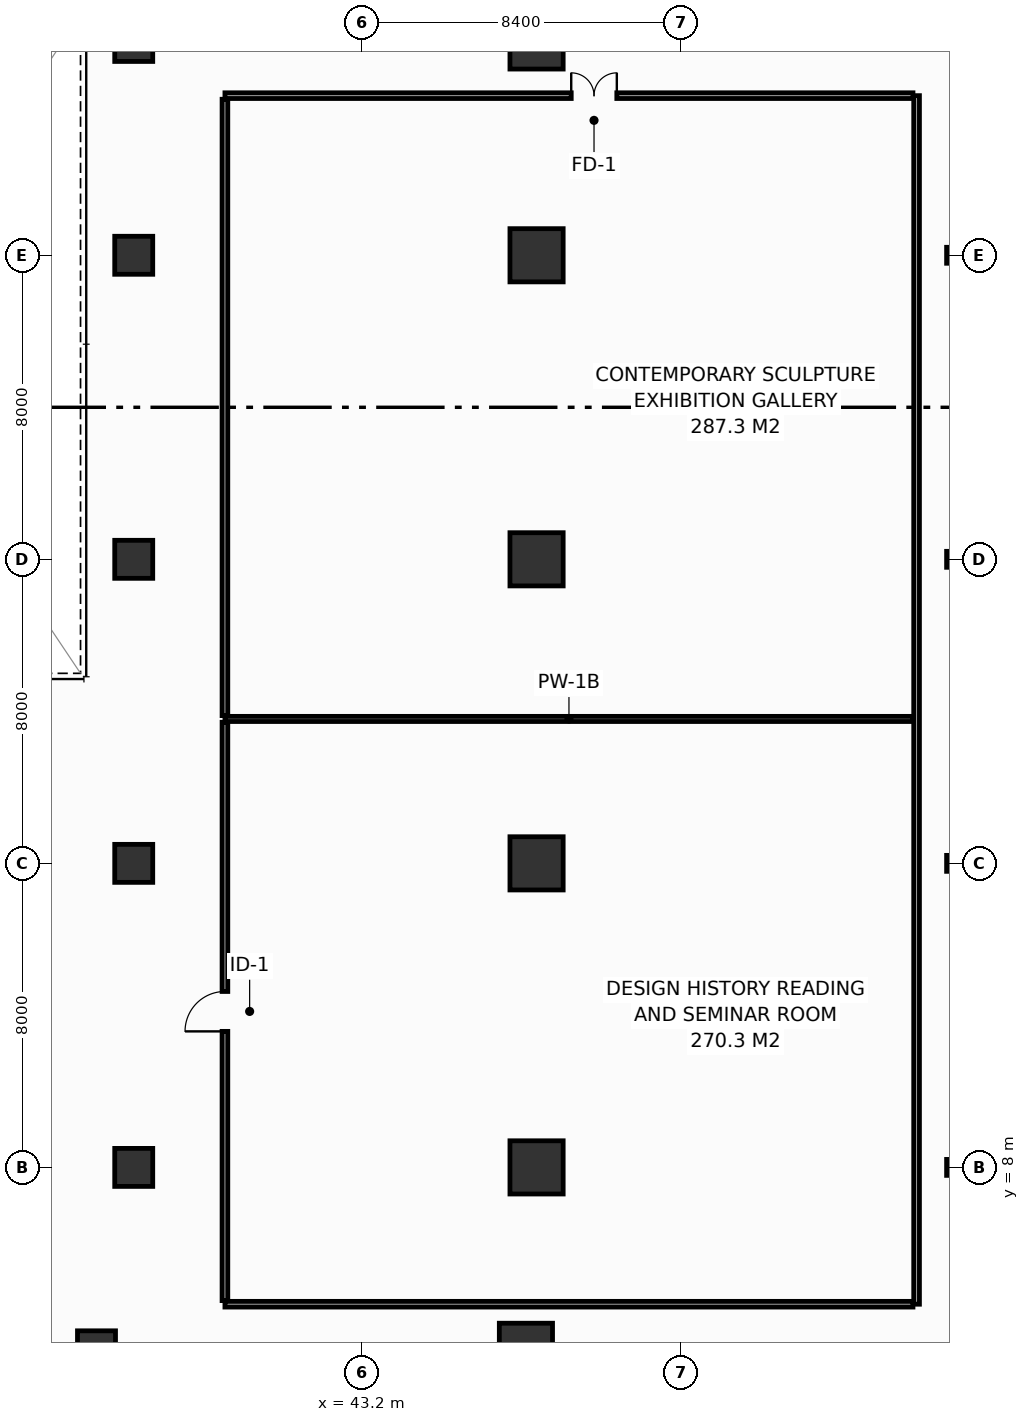
"""IFC4 building model, lengths in metres.
Left out: names, types, materials, properties, quantities, classifications, styles, units other than length and angle.
Written with IfcOpenShell. Run it as: python <this file> out.ifc"""

import sys

from ifc_helpers import new_model, si_unit, direction, frame, frame_2d, origin, origin_2d, place, context, subcontext, project, spatial, rectangle, hollow_rectangle, i_section, extrude, element, fill, save


model = new_model("IFC4")
c1 = context("Model", 3, precision=1e-05, world=origin(), true_north=direction((0.0, 1.0)))
c2 = subcontext(c1, "Body", "Model", "MODEL_VIEW")
j1 = project(units=[si_unit("LENGTHUNIT", "METRE"), si_unit("PLANEANGLEUNIT", "RADIAN")], contexts=[c1])
p1 = place(None, origin())
s1 = spatial("IfcSite", under=j1, at=p1, CompositionType="ELEMENT")
p2 = place(p1, origin())
s2 = spatial("IfcBuilding", under=s1, at=p2, CompositionType="ELEMENT")
p3 = place(p2, frame((0.0, 0.0, 11.4)))
s3 = spatial("IfcBuildingStorey", under=s2, at=p3, CompositionType="ELEMENT", Elevation=11.4)
p4 = place(p3, frame((36.22, 3.2, 0.0), z_axis=(0.0, 0.0, 1.0), x_axis=(1.0, 0.0, 0.0)))
e1 = element("IfcColumn", 1, at=p4, inside=s3, PredefinedType="COLUMN", context=c2, shape_type="SweptSolid", body=[
    extrude(hollow_rectangle(XDim=1.0, YDim=1.0, WallThickness=0.045, at=origin_2d()), origin(), (0.0, 0.0, 1.0), 5.4),
])
p5 = place(p3, frame((47.52, 3.2, 0.0), z_axis=(0.0, 0.0, 1.0), x_axis=(1.0, 0.0, 0.0)))
e2 = element("IfcColumn", 2, at=p5, inside=s3, PredefinedType="COLUMN", context=c2, shape_type="SweptSolid", body=[
    extrude(hollow_rectangle(XDim=1.4, YDim=1.4, WallThickness=0.065, at=origin_2d()), origin(), (0.0, 0.0, 1.0), 5.4),
])
p6 = place(p3, frame((37.2, 8.0, 0.0), z_axis=(0.0, 0.0, 1.0), x_axis=(1.0, 0.0, 0.0)))
e3 = element("IfcColumn", 3, at=p6, inside=s3, PredefinedType="COLUMN", context=c2, shape_type="SweptSolid", body=[
    extrude(hollow_rectangle(XDim=1.0, YDim=1.0, WallThickness=0.045, at=origin_2d()), origin(), (0.0, 0.0, 1.0), 5.4),
])
p7 = place(p3, frame((47.8, 8.0, 0.0), z_axis=(0.0, 0.0, 1.0), x_axis=(1.0, 0.0, 0.0)))
e4 = element("IfcColumn", 4, at=p7, inside=s3, PredefinedType="COLUMN", context=c2, shape_type="SweptSolid", body=[
    extrude(hollow_rectangle(XDim=1.4, YDim=1.4, WallThickness=0.065, at=origin_2d()), origin(), (0.0, 0.0, 1.0), 5.4),
])
p8 = place(p3, frame((37.2, 16.0, 0.0), z_axis=(0.0, 0.0, 1.0), x_axis=(1.0, 0.0, 0.0)))
e5 = element("IfcColumn", 5, at=p8, inside=s3, PredefinedType="COLUMN", context=c2, shape_type="SweptSolid", body=[
    extrude(hollow_rectangle(XDim=1.0, YDim=1.0, WallThickness=0.045, at=origin_2d()), origin(), (0.0, 0.0, 1.0), 5.4),
])
p9 = place(p3, frame((47.8, 16.0, 0.0), z_axis=(0.0, 0.0, 1.0), x_axis=(1.0, 0.0, 0.0)))
e6 = element("IfcColumn", 6, at=p9, inside=s3, PredefinedType="COLUMN", context=c2, shape_type="SweptSolid", body=[
    extrude(hollow_rectangle(XDim=1.4, YDim=1.4, WallThickness=0.065, at=origin_2d()), origin(), (0.0, 0.0, 1.0), 5.4),
])
p10 = place(p3, frame((37.2, 24.0, 0.0), z_axis=(0.0, 0.0, 1.0), x_axis=(1.0, 0.0, 0.0)))
e7 = element("IfcColumn", 7, at=p10, inside=s3, PredefinedType="COLUMN", context=c2, shape_type="SweptSolid", body=[
    extrude(hollow_rectangle(XDim=1.0, YDim=1.0, WallThickness=0.045, at=origin_2d()), origin(), (0.0, 0.0, 1.0), 5.4),
])
p11 = place(p3, frame((47.8, 24.0, 0.0), z_axis=(0.0, 0.0, 1.0), x_axis=(1.0, 0.0, 0.0)))
e8 = element("IfcColumn", 8, at=p11, inside=s3, PredefinedType="COLUMN", context=c2, shape_type="SweptSolid", body=[
    extrude(hollow_rectangle(XDim=1.4, YDim=1.4, WallThickness=0.065, at=origin_2d()), origin(), (0.0, 0.0, 1.0), 5.4),
])
p12 = place(p3, frame((37.2, 32.0, 0.0), z_axis=(0.0, 0.0, 1.0), x_axis=(1.0, 0.0, 0.0)))
e9 = element("IfcColumn", 9, at=p12, inside=s3, PredefinedType="COLUMN", context=c2, shape_type="SweptSolid", body=[
    extrude(hollow_rectangle(XDim=1.0, YDim=1.0, WallThickness=0.045, at=origin_2d()), origin(), (0.0, 0.0, 1.0), 5.4),
])
p13 = place(p3, frame((47.8, 32.0, 0.0), z_axis=(0.0, 0.0, 1.0), x_axis=(1.0, 0.0, 0.0)))
e10 = element("IfcColumn", 10, at=p13, inside=s3, PredefinedType="COLUMN", context=c2, shape_type="SweptSolid", body=[
    extrude(hollow_rectangle(XDim=1.4, YDim=1.4, WallThickness=0.065, at=origin_2d()), origin(), (0.0, 0.0, 1.0), 5.4),
])
p14 = place(p3, frame((37.2, 37.6, 0.0), z_axis=(0.0, 0.0, 1.0), x_axis=(1.0, 0.0, 0.0)))
e11 = element("IfcColumn", 11, at=p14, inside=s3, PredefinedType="COLUMN", context=c2, shape_type="SweptSolid", body=[
    extrude(hollow_rectangle(XDim=1.0, YDim=1.0, WallThickness=0.045, at=origin_2d()), origin(), (0.0, 0.0, 1.0), 5.4),
])
p15 = place(p3, frame((47.8, 37.6, 0.0), z_axis=(0.0, 0.0, 1.0), x_axis=(1.0, 0.0, 0.0)))
e12 = element("IfcColumn", 12, at=p15, inside=s3, PredefinedType="COLUMN", context=c2, shape_type="SweptSolid", body=[
    extrude(hollow_rectangle(XDim=1.4, YDim=1.4, WallThickness=0.065, at=origin_2d()), origin(), (0.0, 0.0, 1.0), 5.4),
])
for number, where, z_axis, x_axis in (
    (13, (58.8, 8.0, 0.0), (0.0, 0.0, 1.0), (1.0, 0.0, 0.0)),
    (14, (58.8, 16.0, 0.0), (0.0, 0.0, 1.0), (1.0, 0.0, 0.0)),
    (15, (58.8, 24.0, 0.0), (0.0, 0.0, 1.0), (1.0, 0.0, 0.0)),
    (16, (58.8, 32.0, 0.0), (0.0, 0.0, 1.0), (1.0, 0.0, 0.0)),
):
    element("IfcColumn", number, at=place(p3, frame(where, z_axis=z_axis, x_axis=x_axis)), inside=s3, PredefinedType="COLUMN", context=c2, shape_type="SweptSolid", body=[
        extrude(i_section(OverallWidth=0.42, OverallDepth=0.42, WebThickness=0.02, FlangeThickness=0.035, FilletRadius=0.022, at=origin_2d()), origin(), (0.0, 0.0, 1.0), 5.4),
    ])
p16 = place(p3, frame((57.8, 4.4, 0.0), z_axis=(0.0, 0.0, 1.0), x_axis=(0.0, 1.0, 0.0)))
e17 = element("IfcWall", 17, at=p16, inside=s3, PredefinedType="PARTITIONING", context=c2, shape_type="SweptSolid", body=[
    extrude(rectangle(XDim=31.8, YDim=0.15, at=frame_2d((15.9, 0.0))), origin(), (0.0, 0.0, 1.0), 4.185),
])
p17 = place(p3, frame((39.6, 4.4, 0.0), z_axis=(0.0, 0.0, 1.0), x_axis=(1.0, 0.0, 0.0)))
e18 = element("IfcWall", 18, at=p17, inside=s3, PredefinedType="PARTITIONING", context=c2, shape_type="SweptSolid", body=[
    extrude(rectangle(XDim=18.105, YDim=0.15, at=frame_2d((9.052, 0.0))), origin(), (0.0, 0.0, 1.0), 4.185),
])
p18 = place(p3, frame((39.6, 19.8, 0.0), z_axis=(0.0, 0.0, 1.0), x_axis=(1.0, 0.0, 0.0)))
e19 = element("IfcWall", 19, at=p18, inside=s3, PredefinedType="PARTITIONING", context=c2, shape_type="SweptSolid", body=[
    extrude(rectangle(XDim=18.105, YDim=0.135, at=frame_2d((9.052, 0.0))), origin(), (0.0, 0.0, 1.0), 4.185),
])
p19 = place(p3, frame((39.6, 36.2, 0.0), z_axis=(0.0, 0.0, 1.0), x_axis=(1.0, 0.0, 0.0)))
e20 = element("IfcWall", 20, at=p19, inside=s3, PredefinedType="PARTITIONING", context=c2, shape_type="SweptSolid", body=[
    extrude(rectangle(XDim=18.105, YDim=0.15, at=frame_2d((9.052, 0.0))), origin(), (0.0, 0.0, 1.0), 4.185),
])
p20 = place(p19, frame((9.112, 0.0, 0.0)))
e21 = element("IfcOpeningElement", 21, at=p20, cuts=e20, PredefinedType="OPENING", context=c2, shape_type="SweptSolid", body=[
    extrude(rectangle(XDim=1.2, YDim=2.15, at=frame_2d((0.6, 1.075))), frame((0.0, 0.085, 0.0), z_axis=(0.0, -1.0, 0.0), x_axis=(1.0, 0.0, 0.0)), (0.0, 0.0, 1.0), 0.17),
])
p21 = place(p3, frame((39.6, 4.495, 0.0), z_axis=(0.0, 0.0, 1.0), x_axis=(0.0, 1.0, 0.0)))
e22 = element("IfcWall", 22, at=p21, inside=s3, PredefinedType="PARTITIONING", context=c2, shape_type="SweptSolid", body=[
    extrude(rectangle(XDim=15.217, YDim=0.15, at=frame_2d((7.609, 0.0))), origin(), (0.0, 0.0, 1.0), 4.185),
])
p22 = place(p21, frame((7.084, 0.0, 0.0)))
e23 = element("IfcOpeningElement", 23, at=p22, cuts=e22, PredefinedType="OPENING", context=c2, shape_type="SweptSolid", body=[
    extrude(rectangle(XDim=1.05, YDim=2.15, at=frame_2d((0.525, 1.075))), frame((0.0, 0.085, 0.0), z_axis=(0.0, -1.0, 0.0), x_axis=(1.0, 0.0, 0.0)), (0.0, 0.0, 1.0), 0.17),
])
p23 = place(p3, frame((39.6, 19.887, 0.0), z_axis=(0.0, 0.0, 1.0), x_axis=(0.0, 1.0, 0.0)))
e24 = element("IfcWall", 24, at=p23, inside=s3, PredefinedType="PARTITIONING", context=c2, shape_type="SweptSolid", body=[
    extrude(rectangle(XDim=16.218, YDim=0.15, at=frame_2d((8.109, 0.0))), origin(), (0.0, 0.0, 1.0), 4.185),
])
p24 = place(p20, origin())
e25 = element("IfcDoor", 25, at=p24, inside=s3, OperationType="DOUBLE_DOOR_SINGLE_SWING", PredefinedType="DOOR", context=c2, shape_type="SweptSolid", body=[
    extrude(rectangle(XDim=1.2, YDim=2.15, at=frame_2d((0.6, 1.075))), frame((0.0, 0.025, 0.0), z_axis=(0.0, -1.0, 0.0), x_axis=(1.0, 0.0, 0.0)), (0.0, 0.0, 1.0), 0.05),
])
fill(e21, e25)
p25 = place(p22, origin())
e26 = element("IfcDoor", 26, at=p25, inside=s3, OperationType="SINGLE_SWING_LEFT", PredefinedType="DOOR", context=c2, shape_type="SweptSolid", body=[
    extrude(rectangle(XDim=1.05, YDim=2.15, at=frame_2d((0.525, 1.075))), frame((0.0, 0.025, 0.0), z_axis=(0.0, -1.0, 0.0), x_axis=(1.0, 0.0, 0.0)), (0.0, 0.0, 1.0), 0.05),
])
fill(e23, e26)
save(model, sys.argv[1])
